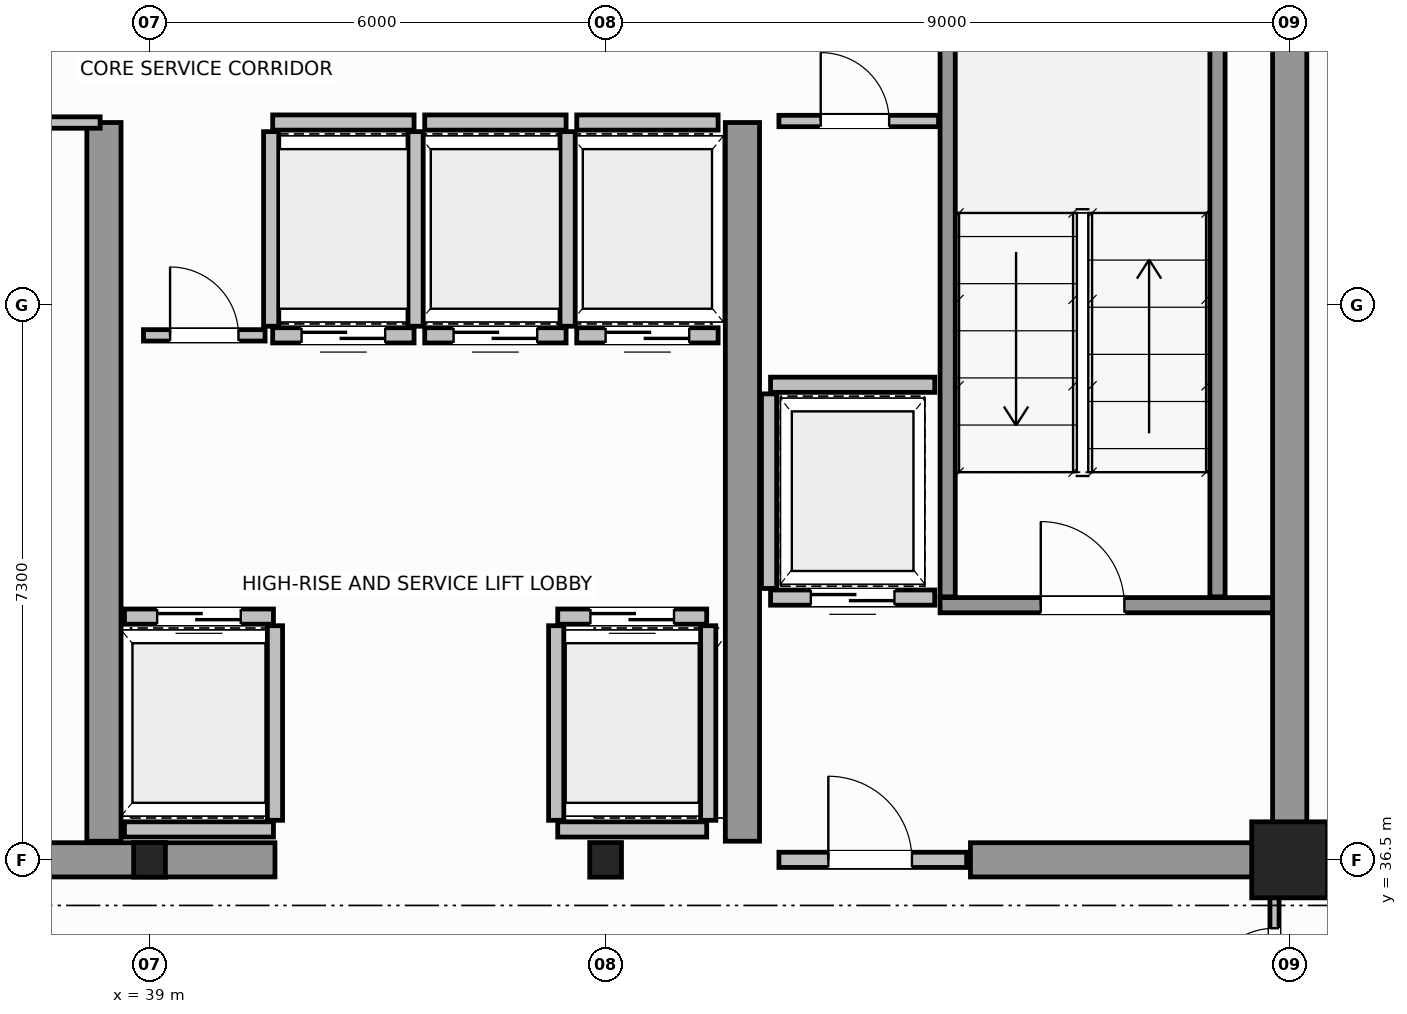
"""IFC4 building model, lengths in metres.
Left out: names, types, materials, properties, quantities, classifications, styles, units other than length and angle.
Written with IfcOpenShell. Run it as: python <this file> out.ifc"""

import sys

from ifc_helpers import new_model, si_unit, direction, frame, frame_2d, origin, origin_2d, place, context, subcontext, project, spatial, rectangle, i_section, extrude, source, transform, mapped, element, fill, save


model = new_model("IFC4")
c1 = context("Model", 3, precision=1e-05, world=origin(), true_north=direction((0.0, 1.0)))
c2 = subcontext(c1, "Body", "Model", "MODEL_VIEW")
j1 = project(units=[si_unit("LENGTHUNIT", "METRE"), si_unit("PLANEANGLEUNIT", "RADIAN")], contexts=[c1])
p1 = place(None, origin())
s1 = spatial("IfcSite", under=j1, at=p1, CompositionType="ELEMENT")
p2 = place(p1, origin())
s2 = spatial("IfcBuilding", under=s1, at=p2, CompositionType="ELEMENT")
p3 = place(p2, frame((0.0, 0.0, 253.6)))
s3 = spatial("IfcBuildingStorey", under=s2, at=p3, CompositionType="ELEMENT", Elevation=253.6)
m1 = source(origin(), c2, "Body", "SweptSolid", [
    extrude(i_section(OverallWidth=0.418, OverallDepth=0.455, WebThickness=0.042, FlangeThickness=0.058, FilletRadius=0.015, at=origin_2d()), origin(), (0.0, 0.0, 1.0), 3.8),
])
for number, where, z_axis, x_axis in (
    (1, (39.0, 36.5, 0.0), (0.0, 0.0, 1.0), (1.0, 0.0, 0.0)),
    (2, (45.0, 36.5, 0.0), (0.0, 0.0, 1.0), (1.0, 0.0, 0.0)),
):
    element("IfcColumn", number, at=place(p3, frame(where, z_axis=z_axis, x_axis=x_axis)), inside=s3, PredefinedType="COLUMN", context=c2, shape_type="MappedRepresentation", body=[
        mapped(m1, transform((0.0, 0.0, 0.0), scale=1.0)),
    ])
m2 = source(origin(), c2, "Body", "SweptSolid", [
    extrude(rectangle(XDim=1.0, YDim=1.0, at=origin_2d()), origin(), (0.0, 0.0, 1.0), 3.8),
])
p4 = place(p3, frame((54.0, 36.5, 0.0), z_axis=(0.0, 0.0, 1.0), x_axis=(1.0, 0.0, 0.0)))
e3 = element("IfcColumn", 3, at=p4, inside=s3, PredefinedType="COLUMN", context=c2, shape_type="MappedRepresentation", body=[
    mapped(m2, transform((0.0, 0.0, 0.0), scale=1.0)),
])
p5 = place(p3, frame((54.0, 36.5, 0.0), z_axis=(0.0, 0.0, 1.0), x_axis=(0.0, 1.0, 0.0)))
e4 = element("IfcWall", 4, at=p5, inside=s3, PredefinedType="SHEAR", context=c2, shape_type="SweptSolid", body=[
    extrude(rectangle(XDim=14.5, YDim=0.45, at=frame_2d((7.25, 0.0))), origin(), (0.0, 0.0, 1.0), 3.8),
])
p6 = place(p3, frame((36.15, 36.5, 0.0), z_axis=(0.0, 0.0, 1.0), x_axis=(1.0, 0.0, 0.0)))
e5 = element("IfcWall", 5, at=p6, inside=s3, PredefinedType="SHEAR", context=c2, shape_type="SweptSolid", body=[
    extrude(rectangle(XDim=4.5, YDim=0.45, at=frame_2d((2.25, 0.0))), origin(), (0.0, 0.0, 1.0), 3.8),
])
p7 = place(p3, frame((49.8, 36.5, 0.0), z_axis=(0.0, 0.0, 1.0), x_axis=(1.0, 0.0, 0.0)))
e6 = element("IfcWall", 6, at=p7, inside=s3, PredefinedType="SHEAR", context=c2, shape_type="SweptSolid", body=[
    extrude(rectangle(XDim=3.955, YDim=0.45, at=frame_2d((1.978, 0.0))), origin(), (0.0, 0.0, 1.0), 2.58),
])
for number, where, z_axis, x_axis in (
    (7, (38.4, 36.745, 0.0), (0.0, 0.0, 1.0), (0.0, 1.0, 0.0)),
    (8, (46.8, 36.745, 0.0), (0.0, 0.0, 1.0), (0.0, 1.0, 0.0)),
):
    element("IfcWall", number, at=place(p3, frame(where, z_axis=z_axis, x_axis=x_axis)), inside=s3, PredefinedType="SHEAR", context=c2, shape_type="SweptSolid", body=[
        extrude(rectangle(XDim=9.455, YDim=0.45, at=frame_2d((4.728, 0.0))), origin(), (0.0, 0.0, 1.0), 3.8),
    ])
p8 = place(p3, frame((49.4, 39.85, 0.0), z_axis=(0.0, 0.0, 1.0), x_axis=(1.0, 0.0, 0.0)))
e9 = element("IfcWall", 9, at=p8, inside=s3, PredefinedType="SOLIDWALL", context=c2, shape_type="SweptSolid", body=[
    extrude(rectangle(XDim=4.375, YDim=0.2, at=frame_2d((2.188, 0.0))), origin(), (0.0, 0.0, 1.0), 3.8),
])
p9 = place(p8, frame((1.325, 0.0, 0.0)))
e10 = element("IfcOpeningElement", 10, at=p9, cuts=e9, PredefinedType="OPENING", context=c2, shape_type="SweptSolid", body=[
    extrude(rectangle(XDim=1.1, YDim=2.15, at=frame_2d((0.55, 1.075))), frame((0.0, 0.11, 0.0), z_axis=(0.0, -1.0, 0.0), x_axis=(1.0, 0.0, 0.0)), (0.0, 0.0, 1.0), 0.22),
])
for number, where, z_axis, x_axis in (
    (11, (49.5, 39.96, 0.0), (0.0, 0.0, 1.0), (0.0, 1.0, 0.0)),
    (12, (53.05, 39.96, 0.0), (0.0, 0.0, 1.0), (0.0, 1.0, 0.0)),
):
    element("IfcWall", number, at=place(p3, frame(where, z_axis=z_axis, x_axis=x_axis)), inside=s3, PredefinedType="SOLIDWALL", context=c2, shape_type="SweptSolid", body=[
        extrude(rectangle(XDim=9.93, YDim=0.2, at=frame_2d((4.965, 0.0))), origin(), (0.0, 0.0, 1.0), 3.8),
    ])
p10 = place(p3, frame((47.28, 36.5, 0.0), z_axis=(0.0, 0.0, 1.0), x_axis=(1.0, 0.0, 0.0)))
e13 = element("IfcWall", 13, at=p10, inside=s3, PredefinedType="SOLIDWALL", context=c2, shape_type="SweptSolid", body=[
    extrude(rectangle(XDim=2.47, YDim=0.2, at=frame_2d((1.235, 0.0))), origin(), (0.0, 0.0, 1.0), 2.57),
])
p11 = place(p10, frame((0.65, 0.0, 0.0)))
e14 = element("IfcOpeningElement", 14, at=p11, cuts=e13, PredefinedType="OPENING", context=c2, shape_type="SweptSolid", body=[
    extrude(rectangle(XDim=1.1, YDim=2.15, at=frame_2d((0.55, 1.075))), frame((0.0, 0.11, 0.0), z_axis=(0.0, -1.0, 0.0), x_axis=(1.0, 0.0, 0.0)), (0.0, 0.0, 1.0), 0.22),
])
p12 = place(p3, frame((38.67, 39.7, 0.0), z_axis=(0.0, 0.0, 1.0), x_axis=(1.0, 0.0, 0.0)))
e15 = element("IfcWall", 15, at=p12, inside=s3, PredefinedType="SOLIDWALL", context=c2, shape_type="SweptSolid", body=[
    extrude(rectangle(XDim=1.96, YDim=0.2, at=frame_2d((0.98, 0.0))), origin(), (0.0, 0.0, 1.0), 3.58),
])
p13 = place(p12, frame((0.43, 0.0, 0.0)))
e16 = element("IfcOpeningElement", 16, at=p13, cuts=e15, PredefinedType="OPENING", context=c2, shape_type="SweptSolid", body=[
    extrude(rectangle(XDim=1.1, YDim=2.15, at=frame_2d((0.55, 1.075))), frame((0.0, 0.11, 0.0), z_axis=(0.0, -1.0, 0.0), x_axis=(1.0, 0.0, 0.0)), (0.0, 0.0, 1.0), 0.22),
])
p14 = place(p3, frame((38.67, 36.9, 0.0), z_axis=(0.0, 0.0, 1.0), x_axis=(1.0, 0.0, 0.0)))
e17 = element("IfcWall", 17, at=p14, inside=s3, PredefinedType="SOLIDWALL", context=c2, shape_type="SweptSolid", body=[
    extrude(rectangle(XDim=1.96, YDim=0.2, at=frame_2d((0.98, 0.0))), origin(), (0.0, 0.0, 1.0), 3.58),
])
p15 = place(p3, frame((40.65, 37.02, 0.0), z_axis=(0.0, 0.0, 1.0), x_axis=(0.0, 1.0, 0.0)))
e18 = element("IfcWall", 18, at=p15, inside=s3, PredefinedType="SOLIDWALL", context=c2, shape_type="SweptSolid", body=[
    extrude(rectangle(XDim=2.56, YDim=0.2, at=frame_2d((1.28, 0.0))), origin(), (0.0, 0.0, 1.0), 3.58),
])
p16 = place(p3, frame((44.37, 39.7, 0.0), z_axis=(0.0, 0.0, 1.0), x_axis=(1.0, 0.0, 0.0)))
e19 = element("IfcWall", 19, at=p16, inside=s3, PredefinedType="SOLIDWALL", context=c2, shape_type="SweptSolid", body=[
    extrude(rectangle(XDim=1.96, YDim=0.2, at=frame_2d((0.98, 0.0))), origin(), (0.0, 0.0, 1.0), 3.58),
])
p17 = place(p16, frame((0.43, 0.0, 0.0)))
e20 = element("IfcOpeningElement", 20, at=p17, cuts=e19, PredefinedType="OPENING", context=c2, shape_type="SweptSolid", body=[
    extrude(rectangle(XDim=1.1, YDim=2.15, at=frame_2d((0.55, 1.075))), frame((0.0, 0.11, 0.0), z_axis=(0.0, -1.0, 0.0), x_axis=(1.0, 0.0, 0.0)), (0.0, 0.0, 1.0), 0.22),
])
p18 = place(p3, frame((44.37, 36.9, 0.0), z_axis=(0.0, 0.0, 1.0), x_axis=(1.0, 0.0, 0.0)))
e21 = element("IfcWall", 21, at=p18, inside=s3, PredefinedType="SOLIDWALL", context=c2, shape_type="SweptSolid", body=[
    extrude(rectangle(XDim=1.96, YDim=0.2, at=frame_2d((0.98, 0.0))), origin(), (0.0, 0.0, 1.0), 2.57),
])
for number, where, z_axis, x_axis in (
    (22, (44.35, 37.02, 0.0), (0.0, 0.0, 1.0), (0.0, 1.0, 0.0)),
    (23, (46.35, 37.02, 0.0), (0.0, 0.0, 1.0), (0.0, 1.0, 0.0)),
):
    element("IfcWall", number, at=place(p3, frame(where, z_axis=z_axis, x_axis=x_axis)), inside=s3, PredefinedType="SOLIDWALL", context=c2, shape_type="SweptSolid", body=[
        extrude(rectangle(XDim=2.56, YDim=0.2, at=frame_2d((1.28, 0.0))), origin(), (0.0, 0.0, 1.0), 3.58),
    ])
p19 = place(p3, frame((40.62, 43.4, 0.0), z_axis=(0.0, 0.0, 1.0), x_axis=(1.0, 0.0, 0.0)))
e24 = element("IfcWall", 24, at=p19, inside=s3, PredefinedType="SOLIDWALL", context=c2, shape_type="SweptSolid", body=[
    extrude(rectangle(XDim=1.86, YDim=0.2, at=frame_2d((0.93, 0.0))), origin(), (0.0, 0.0, 1.0), 3.58),
])
p20 = place(p19, frame((0.38, 0.0, 0.0)))
e25 = element("IfcOpeningElement", 25, at=p20, cuts=e24, PredefinedType="OPENING", context=c2, shape_type="SweptSolid", body=[
    extrude(rectangle(XDim=1.1, YDim=2.15, at=frame_2d((0.55, 1.075))), frame((0.0, 0.11, 0.0), z_axis=(0.0, -1.0, 0.0), x_axis=(1.0, 0.0, 0.0)), (0.0, 0.0, 1.0), 0.22),
])
p21 = place(p3, frame((40.62, 46.2, 0.0), z_axis=(0.0, 0.0, 1.0), x_axis=(1.0, 0.0, 0.0)))
e26 = element("IfcWall", 26, at=p21, inside=s3, PredefinedType="SOLIDWALL", context=c2, shape_type="SweptSolid", body=[
    extrude(rectangle(XDim=1.86, YDim=0.2, at=frame_2d((0.93, 0.0))), origin(), (0.0, 0.0, 1.0), 3.58),
])
for number, where, z_axis, x_axis in (
    (27, (40.6, 43.52, 0.0), (0.0, 0.0, 1.0), (0.0, 1.0, 0.0)),
    (28, (42.5, 43.52, 0.0), (0.0, 0.0, 1.0), (0.0, 1.0, 0.0)),
):
    element("IfcWall", number, at=place(p3, frame(where, z_axis=z_axis, x_axis=x_axis)), inside=s3, PredefinedType="SOLIDWALL", context=c2, shape_type="SweptSolid", body=[
        extrude(rectangle(XDim=2.56, YDim=0.2, at=frame_2d((1.28, 0.0))), origin(), (0.0, 0.0, 1.0), 3.58),
    ])
p22 = place(p3, frame((42.62, 43.4, 0.0), z_axis=(0.0, 0.0, 1.0), x_axis=(1.0, 0.0, 0.0)))
e29 = element("IfcWall", 29, at=p22, inside=s3, PredefinedType="SOLIDWALL", context=c2, shape_type="SweptSolid", body=[
    extrude(rectangle(XDim=1.86, YDim=0.2, at=frame_2d((0.93, 0.0))), origin(), (0.0, 0.0, 1.0), 3.58),
])
p23 = place(p22, frame((0.38, 0.0, 0.0)))
e30 = element("IfcOpeningElement", 30, at=p23, cuts=e29, PredefinedType="OPENING", context=c2, shape_type="SweptSolid", body=[
    extrude(rectangle(XDim=1.1, YDim=2.15, at=frame_2d((0.55, 1.075))), frame((0.0, 0.11, 0.0), z_axis=(0.0, -1.0, 0.0), x_axis=(1.0, 0.0, 0.0)), (0.0, 0.0, 1.0), 0.22),
])
p24 = place(p3, frame((42.62, 46.2, 0.0), z_axis=(0.0, 0.0, 1.0), x_axis=(1.0, 0.0, 0.0)))
e31 = element("IfcWall", 31, at=p24, inside=s3, PredefinedType="SOLIDWALL", context=c2, shape_type="SweptSolid", body=[
    extrude(rectangle(XDim=1.86, YDim=0.2, at=frame_2d((0.93, 0.0))), origin(), (0.0, 0.0, 1.0), 3.58),
])
p25 = place(p3, frame((44.5, 43.52, 0.0), z_axis=(0.0, 0.0, 1.0), x_axis=(0.0, 1.0, 0.0)))
e32 = element("IfcWall", 32, at=p25, inside=s3, PredefinedType="SOLIDWALL", context=c2, shape_type="SweptSolid", body=[
    extrude(rectangle(XDim=2.56, YDim=0.2, at=frame_2d((1.28, 0.0))), origin(), (0.0, 0.0, 1.0), 3.58),
])
p26 = place(p3, frame((44.62, 43.4, 0.0), z_axis=(0.0, 0.0, 1.0), x_axis=(1.0, 0.0, 0.0)))
e33 = element("IfcWall", 33, at=p26, inside=s3, PredefinedType="SOLIDWALL", context=c2, shape_type="SweptSolid", body=[
    extrude(rectangle(XDim=1.86, YDim=0.2, at=frame_2d((0.93, 0.0))), origin(), (0.0, 0.0, 1.0), 3.58),
])
p27 = place(p26, frame((0.38, 0.0, 0.0)))
e34 = element("IfcOpeningElement", 34, at=p27, cuts=e33, PredefinedType="OPENING", context=c2, shape_type="SweptSolid", body=[
    extrude(rectangle(XDim=1.1, YDim=2.15, at=frame_2d((0.55, 1.075))), frame((0.0, 0.11, 0.0), z_axis=(0.0, -1.0, 0.0), x_axis=(1.0, 0.0, 0.0)), (0.0, 0.0, 1.0), 0.22),
])
p28 = place(p3, frame((44.62, 46.2, 0.0), z_axis=(0.0, 0.0, 1.0), x_axis=(1.0, 0.0, 0.0)))
e35 = element("IfcWall", 35, at=p28, inside=s3, PredefinedType="SOLIDWALL", context=c2, shape_type="SweptSolid", body=[
    extrude(rectangle(XDim=1.86, YDim=0.2, at=frame_2d((0.93, 0.0))), origin(), (0.0, 0.0, 1.0), 3.58),
])
p29 = place(p3, frame((47.17, 39.95, 0.0), z_axis=(0.0, 0.0, 1.0), x_axis=(1.0, 0.0, 0.0)))
e36 = element("IfcWall", 36, at=p29, inside=s3, PredefinedType="SOLIDWALL", context=c2, shape_type="SweptSolid", body=[
    extrude(rectangle(XDim=2.16, YDim=0.2, at=frame_2d((1.08, 0.0))), origin(), (0.0, 0.0, 1.0), 3.58),
])
p30 = place(p29, frame((0.53, 0.0, 0.0)))
e37 = element("IfcOpeningElement", 37, at=p30, cuts=e36, PredefinedType="OPENING", context=c2, shape_type="SweptSolid", body=[
    extrude(rectangle(XDim=1.1, YDim=2.15, at=frame_2d((0.55, 1.075))), frame((0.0, 0.11, 0.0), z_axis=(0.0, -1.0, 0.0), x_axis=(1.0, 0.0, 0.0)), (0.0, 0.0, 1.0), 0.22),
])
p31 = place(p3, frame((47.17, 42.75, 0.0), z_axis=(0.0, 0.0, 1.0), x_axis=(1.0, 0.0, 0.0)))
e38 = element("IfcWall", 38, at=p31, inside=s3, PredefinedType="SOLIDWALL", context=c2, shape_type="SweptSolid", body=[
    extrude(rectangle(XDim=2.16, YDim=0.2, at=frame_2d((1.08, 0.0))), origin(), (0.0, 0.0, 1.0), 3.58),
])
p32 = place(p3, frame((47.15, 40.07, 0.0), z_axis=(0.0, 0.0, 1.0), x_axis=(0.0, 1.0, 0.0)))
e39 = element("IfcWall", 39, at=p32, inside=s3, PredefinedType="SOLIDWALL", context=c2, shape_type="SweptSolid", body=[
    extrude(rectangle(XDim=2.56, YDim=0.2, at=frame_2d((1.28, 0.0))), origin(), (0.0, 0.0, 1.0), 3.58),
])
p33 = place(p3, frame((29.85, 46.2, 0.0), z_axis=(0.0, 0.0, 1.0), x_axis=(1.0, 0.0, 0.0)))
e40 = element("IfcWall", 40, at=p33, inside=s3, PredefinedType="PARTITIONING", context=c2, shape_type="SweptSolid", body=[
    extrude(rectangle(XDim=8.5, YDim=0.15, at=frame_2d((4.25, 0.0))), origin(), (0.0, 0.0, 1.0), 3.58),
])
p34 = place(p3, frame((47.28, 46.22, 0.0), z_axis=(0.0, 0.0, 1.0), x_axis=(1.0, 0.0, 0.0)))
e41 = element("IfcWall", 41, at=p34, inside=s3, PredefinedType="PARTITIONING", context=c2, shape_type="SweptSolid", body=[
    extrude(rectangle(XDim=2.1, YDim=0.15, at=frame_2d((1.05, 0.0))), origin(), (0.0, 0.0, 1.0), 3.58),
])
p35 = place(p34, frame((0.55, 0.0, 0.0)))
e42 = element("IfcOpeningElement", 42, at=p35, cuts=e41, PredefinedType="OPENING", context=c2, shape_type="SweptSolid", body=[
    extrude(rectangle(XDim=0.9, YDim=2.1, at=frame_2d((0.45, 1.05))), frame((0.0, 0.085, 0.0), z_axis=(0.0, -1.0, 0.0), x_axis=(1.0, 0.0, 0.0)), (0.0, 0.0, 1.0), 0.17),
])
p36 = place(p3, frame((38.92, 43.4, 0.0), z_axis=(0.0, 0.0, 1.0), x_axis=(1.0, 0.0, 0.0)))
e43 = element("IfcWall", 43, at=p36, inside=s3, PredefinedType="PARTITIONING", context=c2, shape_type="SweptSolid", body=[
    extrude(rectangle(XDim=1.6, YDim=0.15, at=frame_2d((0.8, 0.0))), origin(), (0.0, 0.0, 1.0), 3.58),
])
p37 = place(p36, frame((0.35, 0.0, 0.0)))
e44 = element("IfcOpeningElement", 44, at=p37, cuts=e43, PredefinedType="OPENING", context=c2, shape_type="SweptSolid", body=[
    extrude(rectangle(XDim=0.9, YDim=2.1, at=frame_2d((0.45, 1.05))), frame((0.0, 0.085, 0.0), z_axis=(0.0, -1.0, 0.0), x_axis=(1.0, 0.0, 0.0)), (0.0, 0.0, 1.0), 0.17),
])
p38 = place(p3, frame((53.8, 34.0, 0.0), z_axis=(0.0, 0.0, 1.0), x_axis=(0.0, 1.0, 0.0)))
e45 = element("IfcWall", 45, at=p38, inside=s3, PredefinedType="PARTITIONING", context=c2, shape_type="SweptSolid", body=[
    extrude(rectangle(XDim=2.44, YDim=0.12, at=frame_2d((1.22, 0.0))), origin(), (0.0, 0.0, 1.0), 3.58),
])
p39 = place(p38, frame((0.7, 0.0, 0.0)))
e46 = element("IfcOpeningElement", 46, at=p39, cuts=e45, PredefinedType="OPENING", context=c2, shape_type="SweptSolid", body=[
    extrude(rectangle(XDim=0.9, YDim=2.15, at=frame_2d((0.45, 1.075))), frame((0.0, 0.07, 0.0), z_axis=(0.0, -1.0, 0.0), x_axis=(1.0, 0.0, 0.0)), (0.0, 0.0, 1.0), 0.14),
])
m3 = source(origin(), c2, "Body", "SweptSolid", [
    extrude(rectangle(XDim=1.1, YDim=2.15, at=frame_2d((0.55, 1.075))), frame((0.0, 0.025, 0.0), z_axis=(0.0, -1.0, 0.0), x_axis=(1.0, 0.0, 0.0)), (0.0, 0.0, 1.0), 0.05),
])
p40 = place(p9, origin())
e47 = element("IfcDoor", 47, at=p40, inside=s3, OperationType="SINGLE_SWING_RIGHT", PredefinedType="DOOR", context=c2, shape_type="MappedRepresentation", body=[
    mapped(m3, transform((0.0, 0.0, 0.0), scale=1.0)),
])
fill(e10, e47)
p41 = place(p11, origin())
e48 = element("IfcDoor", 48, at=p41, inside=s3, OperationType="SINGLE_SWING_LEFT", PredefinedType="DOOR", context=c2, shape_type="MappedRepresentation", body=[
    mapped(m3, transform((0.0, 0.0, 0.0), scale=1.0)),
])
fill(e14, e48)
p42 = place(p13, origin())
e49 = element("IfcDoor", 49, at=p42, inside=s3, OperationType="DOUBLE_DOOR_SLIDING", PredefinedType="DOOR", context=c2, shape_type="MappedRepresentation", body=[
    mapped(m3, transform((0.0, 0.0, 0.0), scale=1.0)),
])
fill(e16, e49)
p43 = place(p17, origin())
e50 = element("IfcDoor", 50, at=p43, inside=s3, OperationType="DOUBLE_DOOR_SLIDING", PredefinedType="DOOR", context=c2, shape_type="MappedRepresentation", body=[
    mapped(m3, transform((0.0, 0.0, 0.0), scale=1.0)),
])
fill(e20, e50)
p44 = place(p20, origin())
e51 = element("IfcDoor", 51, at=p44, inside=s3, OperationType="DOUBLE_DOOR_SLIDING", PredefinedType="DOOR", context=c2, shape_type="MappedRepresentation", body=[
    mapped(m3, transform((0.0, 0.0, 0.0), scale=1.0)),
])
fill(e25, e51)
p45 = place(p23, origin())
e52 = element("IfcDoor", 52, at=p45, inside=s3, OperationType="DOUBLE_DOOR_SLIDING", PredefinedType="DOOR", context=c2, shape_type="MappedRepresentation", body=[
    mapped(m3, transform((0.0, 0.0, 0.0), scale=1.0)),
])
fill(e30, e52)
p46 = place(p27, origin())
e53 = element("IfcDoor", 53, at=p46, inside=s3, OperationType="DOUBLE_DOOR_SLIDING", PredefinedType="DOOR", context=c2, shape_type="MappedRepresentation", body=[
    mapped(m3, transform((0.0, 0.0, 0.0), scale=1.0)),
])
fill(e34, e53)
p47 = place(p30, origin())
e54 = element("IfcDoor", 54, at=p47, inside=s3, OperationType="DOUBLE_DOOR_SLIDING", PredefinedType="DOOR", context=c2, shape_type="MappedRepresentation", body=[
    mapped(m3, transform((0.0, 0.0, 0.0), scale=1.0)),
])
fill(e37, e54)
m4 = source(origin(), c2, "Body", "SweptSolid", [
    extrude(rectangle(XDim=0.9, YDim=2.1, at=frame_2d((0.45, 1.05))), frame((0.0, 0.025, 0.0), z_axis=(0.0, -1.0, 0.0), x_axis=(1.0, 0.0, 0.0)), (0.0, 0.0, 1.0), 0.05),
])
p48 = place(p35, origin())
e55 = element("IfcDoor", 55, at=p48, inside=s3, OperationType="SINGLE_SWING_RIGHT", PredefinedType="DOOR", context=c2, shape_type="MappedRepresentation", body=[
    mapped(m4, transform((0.0, 0.0, 0.0), scale=1.0)),
])
fill(e42, e55)
p49 = place(p37, origin())
e56 = element("IfcDoor", 56, at=p49, inside=s3, OperationType="SINGLE_SWING_LEFT", PredefinedType="DOOR", context=c2, shape_type="MappedRepresentation", body=[
    mapped(m4, transform((0.0, 0.0, 0.0), scale=1.0)),
])
fill(e44, e56)
m5 = source(origin(), c2, "Body", "SweptSolid", [
    extrude(rectangle(XDim=0.9, YDim=2.15, at=frame_2d((0.45, 1.075))), frame((0.0, 0.025, 0.0), z_axis=(0.0, -1.0, 0.0), x_axis=(1.0, 0.0, 0.0)), (0.0, 0.0, 1.0), 0.05),
])
p50 = place(p39, origin())
e57 = element("IfcDoor", 57, at=p50, inside=s3, OperationType="SINGLE_SWING_RIGHT", PredefinedType="DOOR", context=c2, shape_type="MappedRepresentation", body=[
    mapped(m5, transform((0.0, 0.0, 0.0), scale=1.0)),
])
fill(e46, e57)
save(model, sys.argv[1])
